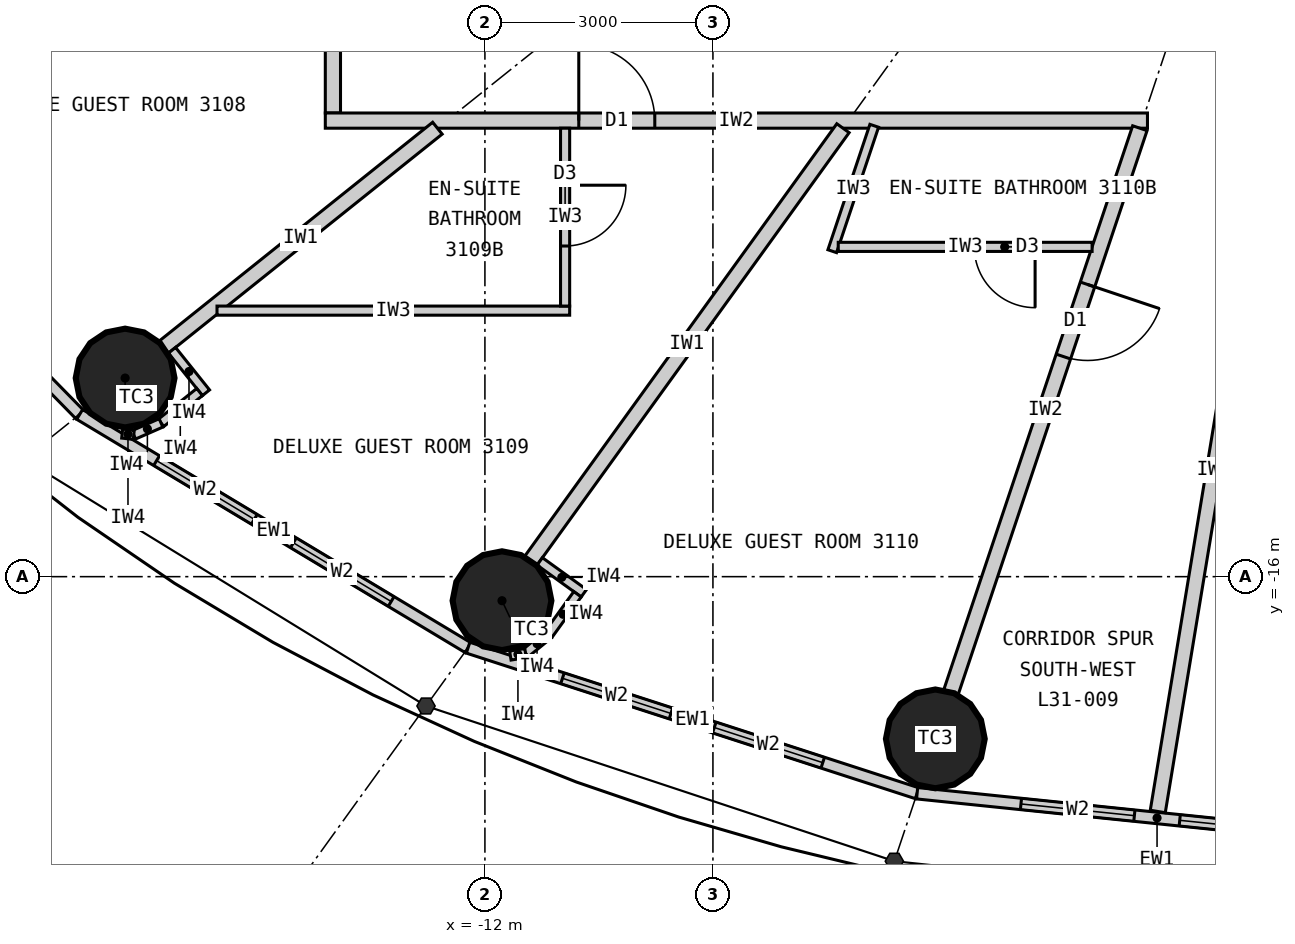
"""IFC4 building model, lengths in metres.
Left out: names, types, materials, properties, quantities, classifications, styles, units other than length and angle.
Written with IfcOpenShell. Run it as: python <this file> out.ifc"""

import sys

from ifc_helpers import new_model, si_unit, direction, frame, frame_2d, origin, origin_2d, place, context, subcontext, project, spatial, rectangle, circle, extrude, element, fill, save


model = new_model("IFC4")
c1 = context("Model", 3, precision=1e-05, world=origin(), true_north=direction((0.0, 1.0)))
c2 = subcontext(c1, "Body", "Model", "MODEL_VIEW")
j1 = project(units=[si_unit("LENGTHUNIT", "METRE"), si_unit("PLANEANGLEUNIT", "RADIAN")], contexts=[c1])
p1 = place(None, origin())
s1 = spatial("IfcSite", under=j1, at=p1, CompositionType="ELEMENT")
p2 = place(p1, origin())
s2 = spatial("IfcBuilding", under=s1, at=p2, CompositionType="ELEMENT")
p3 = place(p2, frame((0.0, 0.0, 122.1)))
s3 = spatial("IfcBuildingStorey", under=s2, at=p3, CompositionType="ELEMENT", Elevation=122.1)
for number, where, z_axis, x_axis in (
    (1, (-16.734, -13.387, 0.0), (0.0, 0.0, 1.0), (1.0, 0.0, 0.0)),
    (2, (-11.775, -16.316, 0.0), (0.0, 0.0, 1.0), (1.0, 0.0, 0.0)),
    (3, (-6.074, -18.135, 0.0), (0.0, 0.0, 1.0), (1.0, 0.0, 0.0)),
):
    element("IfcColumn", number, at=place(p3, frame(where, z_axis=z_axis, x_axis=x_axis)), inside=s3, PredefinedType="COLUMN", context=c2, shape_type="SweptSolid", body=[
        extrude(circle(Radius=0.65, at=origin_2d()), origin(), (0.0, 0.0, 1.0), 3.3),
    ])
p4 = place(p3, frame((-21.287, -9.832, 0.0), z_axis=(0.0, 0.0, 1.0), x_axis=(0.700136650834, -0.714008872605, 0.0)))
e4 = element("IfcWall", 4, at=p4, inside=s3, PredefinedType="ELEMENTEDWALL", context=c2, shape_type="SweptSolid", body=[
    extrude(rectangle(XDim=5.649, YDim=0.15, at=frame_2d((2.825, 0.0))), origin(), (0.0, 0.0, 1.0), 3.12),
])
p5 = place(p4, frame((1.025, 0.0, 0.9)))
e5 = element("IfcOpeningElement", 5, at=p5, cuts=e4, PredefinedType="OPENING", context=c2, shape_type="SweptSolid", body=[
    extrude(rectangle(XDim=1.5, YDim=1.9, at=frame_2d((0.75, 0.95))), frame((0.0, 0.085, 0.0), z_axis=(0.0, -1.0, 0.0), x_axis=(1.0, 0.0, 0.0)), (0.0, 0.0, 1.0), 0.17),
])
p6 = place(p4, frame((3.125, 0.0, 0.9)))
e6 = element("IfcOpeningElement", 6, at=p6, cuts=e4, PredefinedType="OPENING", context=c2, shape_type="SweptSolid", body=[
    extrude(rectangle(XDim=1.5, YDim=1.9, at=frame_2d((0.75, 0.95))), frame((0.0, 0.085, 0.0), z_axis=(0.0, -1.0, 0.0), x_axis=(1.0, 0.0, 0.0)), (0.0, 0.0, 1.0), 0.17),
])
p7 = place(p3, frame((-17.332, -13.866, 0.0), z_axis=(0.0, 0.0, 1.0), x_axis=(0.857308573723, -0.514802884044, 0.0)))
e7 = element("IfcWall", 7, at=p7, inside=s3, PredefinedType="ELEMENTEDWALL", context=c2, shape_type="SweptSolid", body=[
    extrude(rectangle(XDim=5.961, YDim=0.15, at=frame_2d((2.98, 0.0))), origin(), (0.0, 0.0, 1.0), 3.12),
])
p8 = place(p7, frame((1.181, 0.0, 0.9)))
e8 = element("IfcOpeningElement", 8, at=p8, cuts=e7, PredefinedType="OPENING", context=c2, shape_type="SweptSolid", body=[
    extrude(rectangle(XDim=1.5, YDim=1.9, at=frame_2d((0.75, 0.95))), frame((0.0, 0.085, 0.0), z_axis=(0.0, -1.0, 0.0), x_axis=(1.0, 0.0, 0.0)), (0.0, 0.0, 1.0), 0.17),
])
p9 = place(p7, frame((3.281, 0.0, 0.9)))
e9 = element("IfcOpeningElement", 9, at=p9, cuts=e7, PredefinedType="OPENING", context=c2, shape_type="SweptSolid", body=[
    extrude(rectangle(XDim=1.5, YDim=1.9, at=frame_2d((0.75, 0.95))), frame((0.0, 0.085, 0.0), z_axis=(0.0, -1.0, 0.0), x_axis=(1.0, 0.0, 0.0)), (0.0, 0.0, 1.0), 0.17),
])
p10 = place(p3, frame((-12.221, -16.935, 0.0), z_axis=(0.0, 0.0, 1.0), x_axis=(0.951272691506, -0.308350881944, 0.0)))
e10 = element("IfcWall", 10, at=p10, inside=s3, PredefinedType="ELEMENTEDWALL", context=c2, shape_type="SweptSolid", body=[
    extrude(rectangle(XDim=6.211, YDim=0.15, at=frame_2d((3.105, 0.0))), origin(), (0.0, 0.0, 1.0), 3.12),
])
p11 = place(p10, frame((1.305, 0.0, 0.9)))
e11 = element("IfcOpeningElement", 11, at=p11, cuts=e10, PredefinedType="OPENING", context=c2, shape_type="SweptSolid", body=[
    extrude(rectangle(XDim=1.5, YDim=1.9, at=frame_2d((0.75, 0.95))), frame((0.0, 0.085, 0.0), z_axis=(0.0, -1.0, 0.0), x_axis=(1.0, 0.0, 0.0)), (0.0, 0.0, 1.0), 0.17),
])
p12 = place(p10, frame((3.405, 0.0, 0.9)))
e12 = element("IfcOpeningElement", 12, at=p12, cuts=e10, PredefinedType="OPENING", context=c2, shape_type="SweptSolid", body=[
    extrude(rectangle(XDim=1.5, YDim=1.9, at=frame_2d((0.75, 0.95))), frame((0.0, 0.085, 0.0), z_axis=(0.0, -1.0, 0.0), x_axis=(1.0, 0.0, 0.0)), (0.0, 0.0, 1.0), 0.17),
])
p13 = place(p3, frame((-6.313, -18.85, 0.0), z_axis=(0.0, 0.0, 1.0), x_axis=(0.994735690163, -0.102473931887, 0.0)))
e13 = element("IfcWall", 13, at=p13, inside=s3, PredefinedType="ELEMENTEDWALL", context=c2, shape_type="SweptSolid", body=[
    extrude(rectangle(XDim=6.347, YDim=0.15, at=frame_2d((3.173, 0.0))), origin(), (0.0, 0.0, 1.0), 3.12),
])
p14 = place(p13, frame((1.373, 0.0, 0.9)))
e14 = element("IfcOpeningElement", 14, at=p14, cuts=e13, PredefinedType="OPENING", context=c2, shape_type="SweptSolid", body=[
    extrude(rectangle(XDim=1.5, YDim=1.9, at=frame_2d((0.75, 0.95))), frame((0.0, 0.085, 0.0), z_axis=(0.0, -1.0, 0.0), x_axis=(1.0, 0.0, 0.0)), (0.0, 0.0, 1.0), 0.17),
])
p15 = place(p13, frame((3.473, 0.0, 0.9)))
e15 = element("IfcOpeningElement", 15, at=p15, cuts=e13, PredefinedType="OPENING", context=c2, shape_type="SweptSolid", body=[
    extrude(rectangle(XDim=1.5, YDim=1.9, at=frame_2d((0.75, 0.95))), frame((0.0, 0.085, 0.0), z_axis=(0.0, -1.0, 0.0), x_axis=(1.0, 0.0, 0.0)), (0.0, 0.0, 1.0), 0.17),
])
p16 = place(p3, frame((-14.0, 9.9, 0.0), z_axis=(0.0, 0.0, 1.0), x_axis=(0.0, -1.0, 0.0)))
e16 = element("IfcWall", 16, at=p16, inside=s3, PredefinedType="PARTITIONING", context=c2, shape_type="SweptSolid", body=[
    extrude(rectangle(XDim=19.8, YDim=0.2, at=frame_2d((9.9, 0.0))), origin(), (0.0, 0.0, 1.0), 3.12),
])
p17 = place(p16, frame((1.678, 0.0, 0.0)))
e17 = element("IfcOpeningElement", 17, at=p17, cuts=e16, PredefinedType="OPENING", context=c2, shape_type="SweptSolid", body=[
    extrude(rectangle(XDim=1.0, YDim=2.2, at=frame_2d((0.5, 1.1))), frame((0.0, 0.11, 0.0), z_axis=(0.0, -1.0, 0.0), x_axis=(1.0, 0.0, 0.0)), (0.0, 0.0, 1.0), 0.22),
])
p18 = place(p16, frame((7.598, 0.0, 0.0)))
e18 = element("IfcOpeningElement", 18, at=p18, cuts=e16, PredefinedType="OPENING", context=c2, shape_type="SweptSolid", body=[
    extrude(rectangle(XDim=1.0, YDim=2.2, at=frame_2d((0.5, 1.1))), frame((0.0, 0.11, 0.0), z_axis=(0.0, -1.0, 0.0), x_axis=(1.0, 0.0, 0.0)), (0.0, 0.0, 1.0), 0.22),
])
p19 = place(p16, frame((12.26, 0.0, 0.0)))
e19 = element("IfcOpeningElement", 19, at=p19, cuts=e16, PredefinedType="OPENING", context=c2, shape_type="SweptSolid", body=[
    extrude(rectangle(XDim=1.0, YDim=2.2, at=frame_2d((0.5, 1.1))), frame((0.0, 0.11, 0.0), z_axis=(0.0, -1.0, 0.0), x_axis=(1.0, 0.0, 0.0)), (0.0, 0.0, 1.0), 0.22),
])
p20 = place(p16, frame((16.922, 0.0, 0.0)))
e20 = element("IfcOpeningElement", 20, at=p20, cuts=e16, PredefinedType="OPENING", context=c2, shape_type="SweptSolid", body=[
    extrude(rectangle(XDim=1.0, YDim=2.2, at=frame_2d((0.5, 1.1))), frame((0.0, 0.11, 0.0), z_axis=(0.0, -1.0, 0.0), x_axis=(1.0, 0.0, 0.0)), (0.0, 0.0, 1.0), 0.22),
])
p21 = place(p3, frame((-3.283, -10.0, 0.0), z_axis=(0.0, 0.0, 1.0), x_axis=(-1.0, 0.0, 0.0)))
e21 = element("IfcWall", 21, at=p21, inside=s3, PredefinedType="PARTITIONING", context=c2, shape_type="SweptSolid", body=[
    extrude(rectangle(XDim=10.817, YDim=0.2, at=frame_2d((5.409, 0.0))), origin(), (0.0, 0.0, 1.0), 3.12),
])
p22 = place(p21, frame((6.482, 0.0, 0.0)))
e22 = element("IfcOpeningElement", 22, at=p22, cuts=e21, PredefinedType="OPENING", context=c2, shape_type="SweptSolid", body=[
    extrude(rectangle(XDim=1.0, YDim=2.2, at=frame_2d((0.5, 1.1))), frame((0.0, 0.11, 0.0), z_axis=(0.0, -1.0, 0.0), x_axis=(1.0, 0.0, 0.0)), (0.0, 0.0, 1.0), 0.22),
])
p23 = place(p3, frame((-12.625, -10.1, 0.0), z_axis=(0.0, 0.0, 1.0), x_axis=(-0.780863644897, -0.624701503182, 0.0)))
e23 = element("IfcWall", 23, at=p23, inside=s3, PredefinedType="PARTITIONING", context=c2, shape_type="SweptSolid", body=[
    extrude(rectangle(XDim=4.612, YDim=0.2, at=frame_2d((2.306, 0.0))), origin(), (0.0, 0.0, 1.0), 2.37),
])
p24 = place(p3, frame((-7.289, -10.1, 0.0), z_axis=(0.0, 0.0, 1.0), x_axis=(-0.585217367024, -0.81087645997, 0.0)))
e24 = element("IfcWall", 24, at=p24, inside=s3, PredefinedType="PARTITIONING", context=c2, shape_type="SweptSolid", body=[
    extrude(rectangle(XDim=7.016, YDim=0.2, at=frame_2d((3.508, 0.0))), origin(), (0.0, 0.0, 1.0), 2.37),
])
p25 = place(p3, frame((-3.383, -10.1, 0.0), z_axis=(0.0, 0.0, 1.0), x_axis=(-0.317603705574, -0.948223542318, 0.0)))
e25 = element("IfcWall", 25, at=p25, inside=s3, PredefinedType="PARTITIONING", context=c2, shape_type="SweptSolid", body=[
    extrude(rectangle(XDim=7.823, YDim=0.2, at=frame_2d((3.912, 0.0))), origin(), (0.0, 0.0, 1.0), 2.37),
])
p26 = place(p25, frame((2.168, 0.0, 0.0)))
e26 = element("IfcOpeningElement", 26, at=p26, cuts=e25, PredefinedType="OPENING", context=c2, shape_type="SweptSolid", body=[
    extrude(rectangle(XDim=1.0, YDim=2.2, at=frame_2d((0.5, 1.1))), frame((0.0, 0.11, 0.0), z_axis=(0.0, -1.0, 0.0), x_axis=(1.0, 0.0, 0.0)), (0.0, 0.0, 1.0), 0.22),
])
p27 = place(p3, frame((-1.665, -10.1, 0.0), z_axis=(0.0, 0.0, 1.0), x_axis=(-0.162660519103, -0.986682094459, 0.0)))
e27 = element("IfcWall", 27, at=p27, inside=s3, PredefinedType="PARTITIONING", context=c2, shape_type="SweptSolid", body=[
    extrude(rectangle(XDim=9.111, YDim=0.2, at=frame_2d((4.555, 0.0))), origin(), (0.0, 0.0, 1.0), 3.12),
])
p28 = place(p27, frame((1.86, 0.0, 0.0)))
e28 = element("IfcOpeningElement", 28, at=p28, cuts=e27, PredefinedType="OPENING", context=c2, shape_type="SweptSolid", body=[
    extrude(rectangle(XDim=1.0, YDim=2.2, at=frame_2d((0.5, 1.1))), frame((0.0, 0.11, 0.0), z_axis=(0.0, -1.0, 0.0), x_axis=(1.0, 0.0, 0.0)), (0.0, 0.0, 1.0), 0.22),
])
p29 = place(p3, frame((-15.525, -12.5, 0.0), z_axis=(0.0, 0.0, 1.0), x_axis=(1.0, 0.0, 0.0)))
e29 = element("IfcWall", 29, at=p29, inside=s3, PredefinedType="PARTITIONING", context=c2, shape_type="SweptSolid", body=[
    extrude(rectangle(XDim=4.64, YDim=0.12, at=frame_2d((2.32, 0.0))), origin(), (0.0, 0.0, 1.0), 3.12),
])
p30 = place(p3, frame((-10.945, -10.1, 0.0), z_axis=(0.0, 0.0, 1.0), x_axis=(0.0, -1.0, 0.0)))
e30 = element("IfcWall", 30, at=p30, inside=s3, PredefinedType="PARTITIONING", context=c2, shape_type="SweptSolid", body=[
    extrude(rectangle(XDim=2.34, YDim=0.12, at=frame_2d((1.17, 0.0))), origin(), (0.0, 0.0, 1.0), 3.12),
])
p31 = place(p30, frame((0.75, 0.0, 0.0)))
e31 = element("IfcOpeningElement", 31, at=p31, cuts=e30, PredefinedType="OPENING", context=c2, shape_type="SweptSolid", body=[
    extrude(rectangle(XDim=0.8, YDim=2.1, at=frame_2d((0.4, 1.05))), frame((0.0, 0.07, 0.0), z_axis=(0.0, -1.0, 0.0), x_axis=(1.0, 0.0, 0.0)), (0.0, 0.0, 1.0), 0.14),
])
p32 = place(p3, frame((-6.878, -10.068, 0.0), z_axis=(0.0, 0.0, 1.0), x_axis=(-0.317532394508, -0.948247424694, 0.0)))
e32 = element("IfcWall", 32, at=p32, inside=s3, PredefinedType="PARTITIONING", context=c2, shape_type="SweptSolid", body=[
    extrude(rectangle(XDim=1.74, YDim=0.12, at=frame_2d((0.87, 0.0))), origin(), (0.0, 0.0, 1.0), 3.12),
])
p33 = place(p3, frame((-4.011, -11.661, 0.0), z_axis=(0.0, 0.0, 1.0), x_axis=(-1.0, 0.0, 0.0)))
e33 = element("IfcWall", 33, at=p33, inside=s3, PredefinedType="PARTITIONING", context=c2, shape_type="SweptSolid", body=[
    extrude(rectangle(XDim=3.34, YDim=0.12, at=frame_2d((1.67, 0.0))), origin(), (0.0, 0.0, 1.0), 3.12),
])
p34 = place(p33, frame((0.75, 0.0, 0.0)))
e34 = element("IfcOpeningElement", 34, at=p34, cuts=e33, PredefinedType="OPENING", context=c2, shape_type="SweptSolid", body=[
    extrude(rectangle(XDim=0.8, YDim=2.1, at=frame_2d((0.4, 1.05))), frame((0.0, 0.07, 0.0), z_axis=(0.0, -1.0, 0.0), x_axis=(1.0, 0.0, 0.0)), (0.0, 0.0, 1.0), 0.14),
])
p35 = place(p3, frame((-16.117, -13.022, 0.0), z_axis=(0.0, 0.0, 1.0), x_axis=(0.62465344249, -0.780902091677, 0.0)))
e35 = element("IfcWall", 35, at=p35, inside=s3, PredefinedType="PARTITIONING", context=c2, shape_type="SweptSolid", body=[
    extrude(rectangle(XDim=0.716, YDim=0.12, at=frame_2d((0.358, 0.0))), origin(), (0.0, 0.0, 1.0), 3.12),
])
p36 = place(p3, frame((-15.754, -13.571, 0.0), z_axis=(0.0, 0.0, 1.0), x_axis=(-0.780905453553, -0.624649239663, 0.0)))
e36 = element("IfcWall", 36, at=p36, inside=s3, PredefinedType="PARTITIONING", context=c2, shape_type="SweptSolid", body=[
    extrude(rectangle(XDim=0.65, YDim=0.12, at=frame_2d((0.325, 0.0))), origin(), (0.0, 0.0, 1.0), 3.12),
])
p37 = place(p3, frame((-16.262, -13.977, 0.0), z_axis=(0.0, 0.0, 1.0), x_axis=(-0.915985403703, -0.401211590314, 0.0)))
e37 = element("IfcWall", 37, at=p37, inside=s3, PredefinedType="PARTITIONING", context=c2, shape_type="SweptSolid", body=[
    extrude(rectangle(XDim=0.391, YDim=0.12, at=frame_2d((0.196, 0.0))), origin(), (0.0, 0.0, 1.0), 3.12),
])
p38 = place(p3, frame((-16.62, -14.134, 0.0), z_axis=(0.0, 0.0, 1.0), x_axis=(-0.993941871493, 0.109907033867, 0.0)))
e38 = element("IfcWall", 38, at=p38, inside=s3, PredefinedType="PARTITIONING", context=c2, shape_type="SweptSolid", body=[
    extrude(rectangle(XDim=0.153, YDim=0.12, at=frame_2d((0.077, 0.0))), origin(), (0.0, 0.0, 1.0), 3.12),
])
p39 = place(p3, frame((-11.279, -15.799, 0.0), z_axis=(0.0, 0.0, 1.0), x_axis=(0.810912957127, -0.585166793285, 0.0)))
e39 = element("IfcWall", 39, at=p39, inside=s3, PredefinedType="PARTITIONING", context=c2, shape_type="SweptSolid", body=[
    extrude(rectangle(XDim=0.716, YDim=0.12, at=frame_2d((0.358, 0.0))), origin(), (0.0, 0.0, 1.0), 3.12),
])
p40 = place(p3, frame((-10.782, -16.231, 0.0), z_axis=(0.0, 0.0, 1.0), x_axis=(-0.585175102182, -0.810906961239, 0.0)))
e40 = element("IfcWall", 40, at=p40, inside=s3, PredefinedType="PARTITIONING", context=c2, shape_type="SweptSolid", body=[
    extrude(rectangle(XDim=0.65, YDim=0.12, at=frame_2d((0.325, 0.0))), origin(), (0.0, 0.0, 1.0), 3.12),
])
p41 = place(p3, frame((-11.162, -16.759, 0.0), z_axis=(0.0, 0.0, 1.0), x_axis=(-0.775178428527, -0.63174235567, 0.0)))
e41 = element("IfcWall", 41, at=p41, inside=s3, PredefinedType="PARTITIONING", context=c2, shape_type="SweptSolid", body=[
    extrude(rectangle(XDim=0.392, YDim=0.12, at=frame_2d((0.196, 0.0))), origin(), (0.0, 0.0, 1.0), 3.12),
])
p42 = place(p3, frame((-11.466, -17.006, 0.0), z_axis=(0.0, 0.0, 1.0), x_axis=(-0.987228877621, -0.15930832744, 0.0)))
e42 = element("IfcWall", 42, at=p42, inside=s3, PredefinedType="PARTITIONING", context=c2, shape_type="SweptSolid", body=[
    extrude(rectangle(XDim=0.202, YDim=0.12, at=frame_2d((0.101, 0.0))), origin(), (0.0, 0.0, 1.0), 3.12),
])
p43 = place(p8, origin())
e43 = element("IfcWindow", 43, at=p43, inside=s3, PartitioningType="SINGLE_PANEL", PredefinedType="WINDOW", context=c2, shape_type="SweptSolid", body=[
    extrude(rectangle(XDim=1.5, YDim=1.9, at=frame_2d((0.75, 0.95))), frame((0.0, 0.03, 0.0), z_axis=(0.0, -1.0, 0.0), x_axis=(1.0, 0.0, 0.0)), (0.0, 0.0, 1.0), 0.06),
])
fill(e8, e43)
p44 = place(p9, origin())
e44 = element("IfcWindow", 44, at=p44, inside=s3, PartitioningType="SINGLE_PANEL", PredefinedType="WINDOW", context=c2, shape_type="SweptSolid", body=[
    extrude(rectangle(XDim=1.5, YDim=1.9, at=frame_2d((0.75, 0.95))), frame((0.0, 0.03, 0.0), z_axis=(0.0, -1.0, 0.0), x_axis=(1.0, 0.0, 0.0)), (0.0, 0.0, 1.0), 0.06),
])
fill(e9, e44)
p45 = place(p11, origin())
e45 = element("IfcWindow", 45, at=p45, inside=s3, PartitioningType="SINGLE_PANEL", PredefinedType="WINDOW", context=c2, shape_type="SweptSolid", body=[
    extrude(rectangle(XDim=1.5, YDim=1.9, at=frame_2d((0.75, 0.95))), frame((0.0, 0.03, 0.0), z_axis=(0.0, -1.0, 0.0), x_axis=(1.0, 0.0, 0.0)), (0.0, 0.0, 1.0), 0.06),
])
fill(e11, e45)
p46 = place(p12, origin())
e46 = element("IfcWindow", 46, at=p46, inside=s3, PartitioningType="SINGLE_PANEL", PredefinedType="WINDOW", context=c2, shape_type="SweptSolid", body=[
    extrude(rectangle(XDim=1.5, YDim=1.9, at=frame_2d((0.75, 0.95))), frame((0.0, 0.03, 0.0), z_axis=(0.0, -1.0, 0.0), x_axis=(1.0, 0.0, 0.0)), (0.0, 0.0, 1.0), 0.06),
])
fill(e12, e46)
p47 = place(p14, origin())
e47 = element("IfcWindow", 47, at=p47, inside=s3, PartitioningType="SINGLE_PANEL", PredefinedType="WINDOW", context=c2, shape_type="SweptSolid", body=[
    extrude(rectangle(XDim=1.5, YDim=1.9, at=frame_2d((0.75, 0.95))), frame((0.0, 0.03, 0.0), z_axis=(0.0, -1.0, 0.0), x_axis=(1.0, 0.0, 0.0)), (0.0, 0.0, 1.0), 0.06),
])
fill(e14, e47)
p48 = place(p15, origin())
e48 = element("IfcWindow", 48, at=p48, inside=s3, PartitioningType="SINGLE_PANEL", PredefinedType="WINDOW", context=c2, shape_type="SweptSolid", body=[
    extrude(rectangle(XDim=1.5, YDim=1.9, at=frame_2d((0.75, 0.95))), frame((0.0, 0.03, 0.0), z_axis=(0.0, -1.0, 0.0), x_axis=(1.0, 0.0, 0.0)), (0.0, 0.0, 1.0), 0.06),
])
fill(e15, e48)
p49 = place(p31, origin())
e49 = element("IfcDoor", 49, at=p49, inside=s3, OperationType="SINGLE_SWING_LEFT", PredefinedType="DOOR", context=c2, shape_type="SweptSolid", body=[
    extrude(rectangle(XDim=0.8, YDim=2.1, at=frame_2d((0.4, 1.05))), frame((0.0, 0.025, 0.0), z_axis=(0.0, -1.0, 0.0), x_axis=(1.0, 0.0, 0.0)), (0.0, 0.0, 1.0), 0.05),
])
fill(e31, e49)
p50 = place(p22, origin())
e50 = element("IfcDoor", 50, at=p50, inside=s3, OperationType="SINGLE_SWING_RIGHT", PredefinedType="DOOR", context=c2, shape_type="SweptSolid", body=[
    extrude(rectangle(XDim=1.0, YDim=2.2, at=frame_2d((0.5, 1.1))), frame((0.0, 0.025, 0.0), z_axis=(0.0, -1.0, 0.0), x_axis=(1.0, 0.0, 0.0)), (0.0, 0.0, 1.0), 0.05),
])
fill(e22, e50)
p51 = place(p34, origin())
e51 = element("IfcDoor", 51, at=p51, inside=s3, OperationType="SINGLE_SWING_LEFT", PredefinedType="DOOR", context=c2, shape_type="SweptSolid", body=[
    extrude(rectangle(XDim=0.8, YDim=2.1, at=frame_2d((0.4, 1.05))), frame((0.0, 0.025, 0.0), z_axis=(0.0, -1.0, 0.0), x_axis=(1.0, 0.0, 0.0)), (0.0, 0.0, 1.0), 0.05),
])
fill(e34, e51)
p52 = place(p26, origin())
e52 = element("IfcDoor", 52, at=p52, inside=s3, OperationType="SINGLE_SWING_LEFT", PredefinedType="DOOR", context=c2, shape_type="SweptSolid", body=[
    extrude(rectangle(XDim=1.0, YDim=2.2, at=frame_2d((0.5, 1.1))), frame((0.0, 0.025, 0.0), z_axis=(0.0, -1.0, 0.0), x_axis=(1.0, 0.0, 0.0)), (0.0, 0.0, 1.0), 0.05),
])
fill(e26, e52)
save(model, sys.argv[1])
